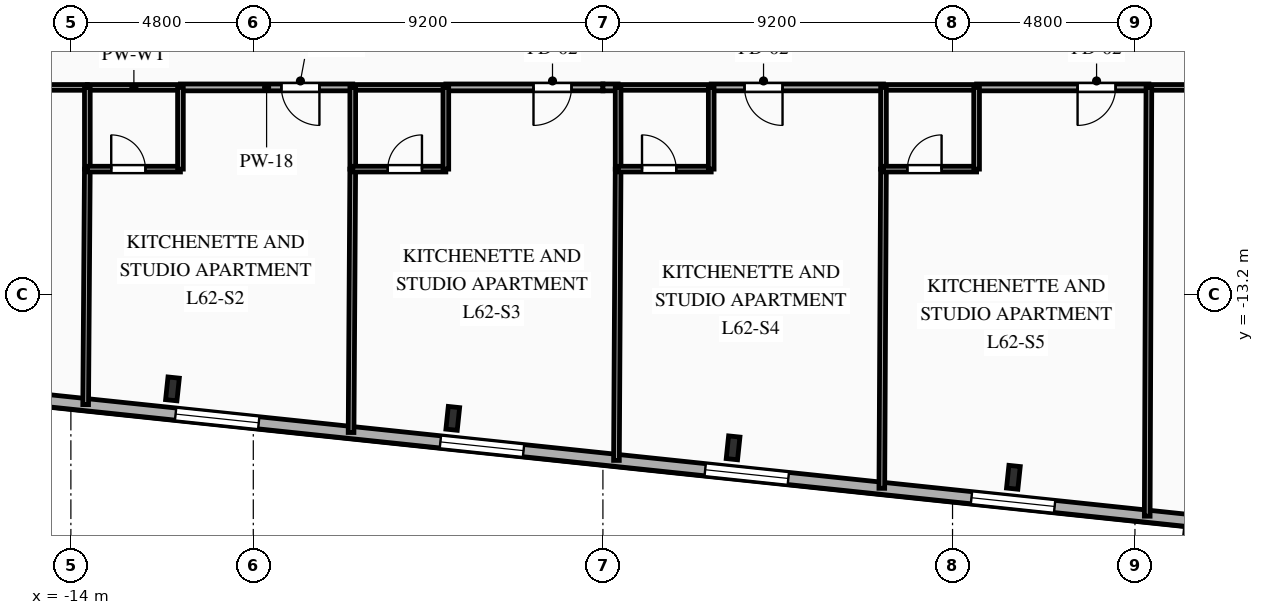
"""IFC4 building model, lengths in metres.
Left out: names, types, materials, properties, quantities, classifications, styles, units other than length and angle.
Written with IfcOpenShell. Run it as: python <this file> out.ifc"""

import sys

from ifc_helpers import new_model, si_unit, direction, frame, frame_2d, origin, origin_2d, place, context, subcontext, project, spatial, rectangle, i_section, extrude, element, fill, save


model = new_model("IFC4")
c1 = context("Model", 3, precision=1e-05, world=origin(), true_north=direction((0.0, 1.0)))
c2 = subcontext(c1, "Body", "Model", "MODEL_VIEW")
j1 = project(units=[si_unit("LENGTHUNIT", "METRE"), si_unit("PLANEANGLEUNIT", "RADIAN")], contexts=[c1])
p1 = place(None, origin())
s1 = spatial("IfcSite", under=j1, at=p1, CompositionType="ELEMENT")
p2 = place(p1, origin())
s2 = spatial("IfcBuilding", under=s1, at=p2, CompositionType="ELEMENT")
p3 = place(p2, frame((0.0, 0.0, 219.85)))
s3 = spatial("IfcBuildingStorey", under=s2, at=p3, CompositionType="ELEMENT", Elevation=219.85)
for number, where, z_axis, x_axis in (
    (1, (-11.327, -15.683, 0.0), (0.0, 0.0, 1.0), (0.995, -0.105, 0.0)),
    (2, (-3.951, -16.458, 0.0), (0.0, 0.0, 1.0), (0.995, -0.105, 0.0)),
    (3, (3.425, -17.233, 0.0), (0.0, 0.0, 1.0), (0.995, -0.105, 0.0)),
    (4, (10.801, -18.009, 0.0), (0.0, 0.0, 1.0), (0.995, -0.105, 0.0)),
):
    element("IfcColumn", number, at=place(p3, frame(where, z_axis=z_axis, x_axis=x_axis)), inside=s3, PredefinedType="COLUMN", context=c2, shape_type="SweptSolid", body=[
        extrude(i_section(OverallWidth=0.3, OverallDepth=0.6, WebThickness=0.015, FlangeThickness=0.03, FilletRadius=0.027, at=origin_2d()), origin(), (0.0, 0.0, 1.0), 3.35),
    ])
p4 = place(p3, frame((18.756, -19.498, 0.0), z_axis=(0.0, 0.0, 1.0), x_axis=(-0.994522060044, 0.104526896475, 0.0)))
e5 = element("IfcWall", 5, at=p4, inside=s3, PredefinedType="SOLIDWALL", context=c2, shape_type="SweptSolid", body=[
    extrude(rectangle(XDim=45.8, YDim=0.32, at=frame_2d((22.9, 0.0))), origin(), (0.0, 0.0, 1.0), 3.0),
])
p5 = place(p4, frame((1.657, 0.0, 0.85)))
e6 = element("IfcOpeningElement", 6, at=p5, cuts=e5, PredefinedType="OPENING", context=c2, shape_type="SweptSolid", body=[
    extrude(rectangle(XDim=1.65, YDim=1.85, at=frame_2d((0.825, 0.925))), frame((0.0, 0.17, 0.0), z_axis=(0.0, -1.0, 0.0), x_axis=(1.0, 0.0, 0.0)), (0.0, 0.0, 1.0), 0.34),
])
p6 = place(p4, frame((6.907, 0.0, 0.85)))
e7 = element("IfcOpeningElement", 7, at=p6, cuts=e5, PredefinedType="OPENING", context=c2, shape_type="SweptSolid", body=[
    extrude(rectangle(XDim=2.2, YDim=1.85, at=frame_2d((1.1, 0.925))), frame((0.0, 0.17, 0.0), z_axis=(0.0, -1.0, 0.0), x_axis=(1.0, 0.0, 0.0)), (0.0, 0.0, 1.0), 0.34),
])
p7 = place(p4, frame((13.953, 0.0, 0.85)))
e8 = element("IfcOpeningElement", 8, at=p7, cuts=e5, PredefinedType="OPENING", context=c2, shape_type="SweptSolid", body=[
    extrude(rectangle(XDim=2.2, YDim=1.85, at=frame_2d((1.1, 0.925))), frame((0.0, 0.17, 0.0), z_axis=(0.0, -1.0, 0.0), x_axis=(1.0, 0.0, 0.0)), (0.0, 0.0, 1.0), 0.34),
])
p8 = place(p4, frame((20.959, 0.0, 0.85)))
e9 = element("IfcOpeningElement", 9, at=p8, cuts=e5, PredefinedType="OPENING", context=c2, shape_type="SweptSolid", body=[
    extrude(rectangle(XDim=2.2, YDim=1.85, at=frame_2d((1.1, 0.925))), frame((0.0, 0.17, 0.0), z_axis=(0.0, -1.0, 0.0), x_axis=(1.0, 0.0, 0.0)), (0.0, 0.0, 1.0), 0.34),
])
p9 = place(p4, frame((27.965, 0.0, 0.85)))
e10 = element("IfcOpeningElement", 10, at=p9, cuts=e5, PredefinedType="OPENING", context=c2, shape_type="SweptSolid", body=[
    extrude(rectangle(XDim=2.2, YDim=1.85, at=frame_2d((1.1, 0.925))), frame((0.0, 0.17, 0.0), z_axis=(0.0, -1.0, 0.0), x_axis=(1.0, 0.0, 0.0)), (0.0, 0.0, 1.0), 0.34),
])
p10 = place(p4, frame((35.487, 0.0, 0.85)))
e11 = element("IfcOpeningElement", 11, at=p10, cuts=e5, PredefinedType="OPENING", context=c2, shape_type="SweptSolid", body=[
    extrude(rectangle(XDim=1.65, YDim=1.85, at=frame_2d((0.825, 0.925))), frame((0.0, 0.17, 0.0), z_axis=(0.0, -1.0, 0.0), x_axis=(1.0, 0.0, 0.0)), (0.0, 0.0, 1.0), 0.34),
])
p11 = place(p4, frame((41.212, 0.0, 0.85)))
e12 = element("IfcOpeningElement", 12, at=p11, cuts=e5, PredefinedType="OPENING", context=c2, shape_type="SweptSolid", body=[
    extrude(rectangle(XDim=1.65, YDim=1.85, at=frame_2d((0.825, 0.925))), frame((0.0, 0.17, 0.0), z_axis=(0.0, -1.0, 0.0), x_axis=(1.0, 0.0, 0.0)), (0.0, 0.0, 1.0), 0.34),
])
p12 = place(p3, frame((-13.567, -7.75, 0.0), z_axis=(0.0, 0.0, 1.0), x_axis=(-1.0, 0.0, 0.0)))
e13 = element("IfcWall", 13, at=p12, inside=s3, PredefinedType="PARTITIONING", context=c2, shape_type="SweptSolid", body=[
    extrude(rectangle(XDim=7.383, YDim=0.15, at=frame_2d((3.691, 0.0))), origin(), (0.0, 0.0, 1.0), 3.0),
])
p13 = place(p12, frame((1.227, 0.0, 0.0)))
e14 = element("IfcOpeningElement", 14, at=p13, cuts=e13, PredefinedType="OPENING", context=c2, shape_type="SweptSolid", body=[
    extrude(rectangle(XDim=1.05, YDim=2.15, at=frame_2d((0.525, 1.075))), frame((0.0, 0.085, 0.0), z_axis=(0.0, -1.0, 0.0), x_axis=(1.0, 0.0, 0.0)), (0.0, 0.0, 1.0), 0.17),
])
p14 = place(p3, frame((-6.583, -7.75, 0.0), z_axis=(0.0, 0.0, 1.0), x_axis=(-1.0, 0.0, 0.0)))
e15 = element("IfcWall", 15, at=p14, inside=s3, PredefinedType="PARTITIONING", context=c2, shape_type="SweptSolid", body=[
    extrude(rectangle(XDim=4.534, YDim=0.18, at=frame_2d((2.267, 0.0))), origin(), (0.0, 0.0, 1.0), 3.0),
])
p15 = place(p14, frame((0.877, 0.0, 0.0)))
e16 = element("IfcOpeningElement", 16, at=p15, cuts=e15, PredefinedType="OPENING", context=c2, shape_type="SweptSolid", body=[
    extrude(rectangle(XDim=1.0, YDim=2.15, at=frame_2d((0.5, 1.075))), frame((0.0, 0.1, 0.0), z_axis=(0.0, -1.0, 0.0), x_axis=(1.0, 0.0, 0.0)), (0.0, 0.0, 1.0), 0.2),
])
p16 = place(p3, frame((-11.117, -7.75, 0.0), z_axis=(0.0, 0.0, 1.0), x_axis=(-1.0, 0.0, 0.0)))
e17 = element("IfcWall", 17, at=p16, inside=s3, PredefinedType="PLUMBINGWALL", context=c2, shape_type="SweptSolid", body=[
    extrude(rectangle(XDim=2.45, YDim=0.15, at=frame_2d((1.225, 0.0))), origin(), (0.0, 0.0, 1.0), 3.0),
])
p17 = place(p3, frame((0.0, -7.75, 0.0), z_axis=(0.0, 0.0, 1.0), x_axis=(-1.0, 0.0, 0.0)))
e18 = element("IfcWall", 18, at=p17, inside=s3, PredefinedType="PARTITIONING", context=c2, shape_type="SweptSolid", body=[
    extrude(rectangle(XDim=4.133, YDim=0.18, at=frame_2d((2.066, 0.0))), origin(), (0.0, 0.0, 1.0), 3.0),
])
p18 = place(p17, frame((0.827, 0.0, 0.0)))
e19 = element("IfcOpeningElement", 19, at=p18, cuts=e18, PredefinedType="OPENING", context=c2, shape_type="SweptSolid", body=[
    extrude(rectangle(XDim=1.0, YDim=2.15, at=frame_2d((0.5, 1.075))), frame((0.0, 0.1, 0.0), z_axis=(0.0, -1.0, 0.0), x_axis=(1.0, 0.0, 0.0)), (0.0, 0.0, 1.0), 0.2),
])
p19 = place(p3, frame((-4.133, -7.75, 0.0), z_axis=(0.0, 0.0, 1.0), x_axis=(-1.0, 0.0, 0.0)))
e20 = element("IfcWall", 20, at=p19, inside=s3, PredefinedType="PLUMBINGWALL", context=c2, shape_type="SweptSolid", body=[
    extrude(rectangle(XDim=2.45, YDim=0.15, at=frame_2d((1.225, 0.0))), origin(), (0.0, 0.0, 1.0), 3.0),
])
p20 = place(p3, frame((0.4, -7.75, 0.0), z_axis=(0.0, 0.0, 1.0), x_axis=(-1.0, 0.0, 0.0)))
e21 = element("IfcWall", 21, at=p20, inside=s3, PredefinedType="PARTITIONING", context=c2, shape_type="SweptSolid", body=[
    extrude(rectangle(XDim=0.4, YDim=0.18, at=frame_2d((0.2, 0.0))), origin(), (0.0, 0.0, 1.0), 3.0),
])
p21 = place(p3, frame((7.383, -7.75, 0.0), z_axis=(0.0, 0.0, 1.0), x_axis=(-1.0, 0.0, 0.0)))
e22 = element("IfcWall", 22, at=p21, inside=s3, PredefinedType="PARTITIONING", context=c2, shape_type="SweptSolid", body=[
    extrude(rectangle(XDim=4.533, YDim=0.18, at=frame_2d((2.267, 0.0))), origin(), (0.0, 0.0, 1.0), 3.0),
])
p22 = place(p21, frame((2.656, 0.0, 0.0)))
e23 = element("IfcOpeningElement", 23, at=p22, cuts=e22, PredefinedType="OPENING", context=c2, shape_type="SweptSolid", body=[
    extrude(rectangle(XDim=1.0, YDim=2.15, at=frame_2d((0.5, 1.075))), frame((0.0, 0.1, 0.0), z_axis=(0.0, -1.0, 0.0), x_axis=(1.0, 0.0, 0.0)), (0.0, 0.0, 1.0), 0.2),
])
p23 = place(p3, frame((2.85, -7.75, 0.0), z_axis=(0.0, 0.0, 1.0), x_axis=(-1.0, 0.0, 0.0)))
e24 = element("IfcWall", 24, at=p23, inside=s3, PredefinedType="PLUMBINGWALL", context=c2, shape_type="SweptSolid", body=[
    extrude(rectangle(XDim=2.45, YDim=0.15, at=frame_2d((1.225, 0.0))), origin(), (0.0, 0.0, 1.0), 3.0),
])
p24 = place(p3, frame((14.367, -7.75, 0.0), z_axis=(0.0, 0.0, 1.0), x_axis=(-1.0, 0.0, 0.0)))
e25 = element("IfcWall", 25, at=p24, inside=s3, PredefinedType="PARTITIONING", context=c2, shape_type="SweptSolid", body=[
    extrude(rectangle(XDim=4.534, YDim=0.18, at=frame_2d((2.267, 0.0))), origin(), (0.0, 0.0, 1.0), 3.0),
])
p25 = place(p24, frame((0.877, 0.0, 0.0)))
e26 = element("IfcOpeningElement", 26, at=p25, cuts=e25, PredefinedType="OPENING", context=c2, shape_type="SweptSolid", body=[
    extrude(rectangle(XDim=1.0, YDim=2.15, at=frame_2d((0.5, 1.075))), frame((0.0, 0.1, 0.0), z_axis=(0.0, -1.0, 0.0), x_axis=(1.0, 0.0, 0.0)), (0.0, 0.0, 1.0), 0.2),
])
p26 = place(p3, frame((9.833, -7.75, 0.0), z_axis=(0.0, 0.0, 1.0), x_axis=(-1.0, 0.0, 0.0)))
e27 = element("IfcWall", 27, at=p26, inside=s3, PredefinedType="PLUMBINGWALL", context=c2, shape_type="SweptSolid", body=[
    extrude(rectangle(XDim=2.45, YDim=0.15, at=frame_2d((1.225, 0.0))), origin(), (0.0, 0.0, 1.0), 3.0),
])
p27 = place(p3, frame((20.95, -7.75, 0.0), z_axis=(0.0, 0.0, 1.0), x_axis=(-1.0, 0.0, 0.0)))
e28 = element("IfcWall", 28, at=p27, inside=s3, PredefinedType="PARTITIONING", context=c2, shape_type="SweptSolid", body=[
    extrude(rectangle(XDim=6.583, YDim=0.15, at=frame_2d((3.292, 0.0))), origin(), (0.0, 0.0, 1.0), 3.0),
])
p28 = place(p27, frame((4.406, 0.0, 0.0)))
e29 = element("IfcOpeningElement", 29, at=p28, cuts=e28, PredefinedType="OPENING", context=c2, shape_type="SweptSolid", body=[
    extrude(rectangle(XDim=1.05, YDim=2.15, at=frame_2d((0.525, 1.075))), frame((0.0, 0.085, 0.0), z_axis=(0.0, -1.0, 0.0), x_axis=(1.0, 0.0, 0.0)), (0.0, 0.0, 1.0), 0.17),
])
p29 = place(p3, frame((-13.567, -9.9, 0.0), z_axis=(0.0, 0.0, 1.0), x_axis=(-0.007091740814, -0.99997485329, 0.0)))
e30 = element("IfcWall", 30, at=p29, inside=s3, PredefinedType="PARTITIONING", context=c2, shape_type="SweptSolid", body=[
    extrude(rectangle(XDim=6.197, YDim=0.15, at=frame_2d((3.098, 0.0))), origin(), (0.0, 0.0, 1.0), 3.0),
])
p30 = place(p3, frame((-13.567, -7.75, 0.0), z_axis=(0.0, 0.0, 1.0), x_axis=(0.0, -1.0, 0.0)))
e31 = element("IfcWall", 31, at=p30, inside=s3, PredefinedType="PLUMBINGWALL", context=c2, shape_type="SweptSolid", body=[
    extrude(rectangle(XDim=2.15, YDim=0.15, at=frame_2d((1.075, 0.0))), origin(), (0.0, 0.0, 1.0), 3.0),
])
p31 = place(p3, frame((-13.567, -9.9, 0.0), z_axis=(0.0, 0.0, 1.0), x_axis=(1.0, 0.0, 0.0)))
e32 = element("IfcWall", 32, at=p31, inside=s3, PredefinedType="PLUMBINGWALL", context=c2, shape_type="SweptSolid", body=[
    extrude(rectangle(XDim=2.45, YDim=0.15, at=frame_2d((1.225, 0.0))), origin(), (0.0, 0.0, 1.0), 3.0),
])
p32 = place(p31, frame((0.629, 0.0, 0.0)))
e33 = element("IfcOpeningElement", 33, at=p32, cuts=e32, PredefinedType="OPENING", context=c2, shape_type="SweptSolid", body=[
    extrude(rectangle(XDim=0.9, YDim=2.1, at=frame_2d((0.45, 1.05))), frame((0.0, 0.085, 0.0), z_axis=(0.0, -1.0, 0.0), x_axis=(1.0, 0.0, 0.0)), (0.0, 0.0, 1.0), 0.17),
])
p33 = place(p3, frame((-11.117, -9.9, 0.0), z_axis=(0.0, 0.0, 1.0), x_axis=(0.0, 1.0, 0.0)))
e34 = element("IfcWall", 34, at=p33, inside=s3, PredefinedType="PLUMBINGWALL", context=c2, shape_type="SweptSolid", body=[
    extrude(rectangle(XDim=2.15, YDim=0.15, at=frame_2d((1.075, 0.0))), origin(), (0.0, 0.0, 1.0), 3.0),
])
p34 = place(p3, frame((-6.583, -9.9, 0.0), z_axis=(0.0, 0.0, 1.0), x_axis=(-0.006340579882, -0.999979898321, 0.0)))
e35 = element("IfcWall", 35, at=p34, inside=s3, PredefinedType="PARTITIONING", context=c2, shape_type="SweptSolid", body=[
    extrude(rectangle(XDim=6.931, YDim=0.15, at=frame_2d((3.465, 0.0))), origin(), (0.0, 0.0, 1.0), 3.0),
])
p35 = place(p3, frame((-6.583, -7.75, 0.0), z_axis=(0.0, 0.0, 1.0), x_axis=(0.0, -1.0, 0.0)))
e36 = element("IfcWall", 36, at=p35, inside=s3, PredefinedType="PLUMBINGWALL", context=c2, shape_type="SweptSolid", body=[
    extrude(rectangle(XDim=2.15, YDim=0.15, at=frame_2d((1.075, 0.0))), origin(), (0.0, 0.0, 1.0), 3.0),
])
p36 = place(p3, frame((-6.583, -9.9, 0.0), z_axis=(0.0, 0.0, 1.0), x_axis=(1.0, 0.0, 0.0)))
e37 = element("IfcWall", 37, at=p36, inside=s3, PredefinedType="PLUMBINGWALL", context=c2, shape_type="SweptSolid", body=[
    extrude(rectangle(XDim=2.45, YDim=0.15, at=frame_2d((1.225, 0.0))), origin(), (0.0, 0.0, 1.0), 3.0),
])
p37 = place(p36, frame((0.921, 0.0, 0.0)))
e38 = element("IfcOpeningElement", 38, at=p37, cuts=e37, PredefinedType="OPENING", context=c2, shape_type="SweptSolid", body=[
    extrude(rectangle(XDim=0.9, YDim=2.1, at=frame_2d((0.45, 1.05))), frame((0.0, 0.085, 0.0), z_axis=(0.0, -1.0, 0.0), x_axis=(1.0, 0.0, 0.0)), (0.0, 0.0, 1.0), 0.17),
])
p38 = place(p3, frame((-4.133, -9.9, 0.0), z_axis=(0.0, 0.0, 1.0), x_axis=(0.0, 1.0, 0.0)))
e39 = element("IfcWall", 39, at=p38, inside=s3, PredefinedType="PLUMBINGWALL", context=c2, shape_type="SweptSolid", body=[
    extrude(rectangle(XDim=2.15, YDim=0.15, at=frame_2d((1.075, 0.0))), origin(), (0.0, 0.0, 1.0), 3.0),
])
p39 = place(p3, frame((0.4, -9.9, 0.0), z_axis=(0.0, 0.0, 1.0), x_axis=(-0.005701633766, -0.999983745554, 0.0)))
e40 = element("IfcWall", 40, at=p39, inside=s3, PredefinedType="PARTITIONING", context=c2, shape_type="SweptSolid", body=[
    extrude(rectangle(XDim=7.665, YDim=0.15, at=frame_2d((3.833, 0.0))), origin(), (0.0, 0.0, 1.0), 3.0),
])
p40 = place(p3, frame((0.4, -7.75, 0.0), z_axis=(0.0, 0.0, 1.0), x_axis=(0.0, -1.0, 0.0)))
e41 = element("IfcWall", 41, at=p40, inside=s3, PredefinedType="PLUMBINGWALL", context=c2, shape_type="SweptSolid", body=[
    extrude(rectangle(XDim=2.15, YDim=0.15, at=frame_2d((1.075, 0.0))), origin(), (0.0, 0.0, 1.0), 3.0),
])
p41 = place(p3, frame((0.4, -9.9, 0.0), z_axis=(0.0, 0.0, 1.0), x_axis=(1.0, 0.0, 0.0)))
e42 = element("IfcWall", 42, at=p41, inside=s3, PredefinedType="PLUMBINGWALL", context=c2, shape_type="SweptSolid", body=[
    extrude(rectangle(XDim=2.45, YDim=0.15, at=frame_2d((1.225, 0.0))), origin(), (0.0, 0.0, 1.0), 3.0),
])
p42 = place(p41, frame((0.629, 0.0, 0.0)))
e43 = element("IfcOpeningElement", 43, at=p42, cuts=e42, PredefinedType="OPENING", context=c2, shape_type="SweptSolid", body=[
    extrude(rectangle(XDim=0.9, YDim=2.1, at=frame_2d((0.45, 1.05))), frame((0.0, 0.085, 0.0), z_axis=(0.0, -1.0, 0.0), x_axis=(1.0, 0.0, 0.0)), (0.0, 0.0, 1.0), 0.17),
])
p43 = place(p3, frame((2.85, -9.9, 0.0), z_axis=(0.0, 0.0, 1.0), x_axis=(0.0, 1.0, 0.0)))
e44 = element("IfcWall", 44, at=p43, inside=s3, PredefinedType="PLUMBINGWALL", context=c2, shape_type="SweptSolid", body=[
    extrude(rectangle(XDim=2.15, YDim=0.15, at=frame_2d((1.075, 0.0))), origin(), (0.0, 0.0, 1.0), 3.0),
])
p44 = place(p3, frame((7.383, -9.9, 0.0), z_axis=(0.0, 0.0, 1.0), x_axis=(-0.00523233441, -0.999986311245, 0.0)))
e45 = element("IfcWall", 45, at=p44, inside=s3, PredefinedType="PARTITIONING", context=c2, shape_type="SweptSolid", body=[
    extrude(rectangle(XDim=8.399, YDim=0.15, at=frame_2d((4.199, 0.0))), origin(), (0.0, 0.0, 1.0), 3.0),
])
p45 = place(p3, frame((7.383, -7.75, 0.0), z_axis=(0.0, 0.0, 1.0), x_axis=(0.0, -1.0, 0.0)))
e46 = element("IfcWall", 46, at=p45, inside=s3, PredefinedType="PLUMBINGWALL", context=c2, shape_type="SweptSolid", body=[
    extrude(rectangle(XDim=2.15, YDim=0.15, at=frame_2d((1.075, 0.0))), origin(), (0.0, 0.0, 1.0), 3.0),
])
p46 = place(p3, frame((7.383, -9.9, 0.0), z_axis=(0.0, 0.0, 1.0), x_axis=(1.0, 0.0, 0.0)))
e47 = element("IfcWall", 47, at=p46, inside=s3, PredefinedType="PLUMBINGWALL", context=c2, shape_type="SweptSolid", body=[
    extrude(rectangle(XDim=2.45, YDim=0.15, at=frame_2d((1.225, 0.0))), origin(), (0.0, 0.0, 1.0), 3.0),
])
p47 = place(p46, frame((0.629, 0.0, 0.0)))
e48 = element("IfcOpeningElement", 48, at=p47, cuts=e47, PredefinedType="OPENING", context=c2, shape_type="SweptSolid", body=[
    extrude(rectangle(XDim=0.9, YDim=2.1, at=frame_2d((0.45, 1.05))), frame((0.0, 0.085, 0.0), z_axis=(0.0, -1.0, 0.0), x_axis=(1.0, 0.0, 0.0)), (0.0, 0.0, 1.0), 0.17),
])
p48 = place(p3, frame((9.833, -9.9, 0.0), z_axis=(0.0, 0.0, 1.0), x_axis=(0.0, 1.0, 0.0)))
e49 = element("IfcWall", 49, at=p48, inside=s3, PredefinedType="PLUMBINGWALL", context=c2, shape_type="SweptSolid", body=[
    extrude(rectangle(XDim=2.15, YDim=0.15, at=frame_2d((1.075, 0.0))), origin(), (0.0, 0.0, 1.0), 3.0),
])
p49 = place(p3, frame((14.367, -7.75, 0.0), z_axis=(0.0, 0.0, 1.0), x_axis=(-0.003894978353, -0.999992414543, 0.0)))
e50 = element("IfcWall", 50, at=p49, inside=s3, PredefinedType="PARTITIONING", context=c2, shape_type="SweptSolid", body=[
    extrude(rectangle(XDim=11.282, YDim=0.15, at=frame_2d((5.641, 0.0))), origin(), (0.0, 0.0, 1.0), 3.0),
])
p50 = place(p6, origin())
e51 = element("IfcWindow", 51, at=p50, inside=s3, PartitioningType="SINGLE_PANEL", PredefinedType="WINDOW", context=c2, shape_type="SweptSolid", body=[
    extrude(rectangle(XDim=2.2, YDim=1.85, at=frame_2d((1.1, 0.925))), frame((0.0, 0.03, 0.0), z_axis=(0.0, -1.0, 0.0), x_axis=(1.0, 0.0, 0.0)), (0.0, 0.0, 1.0), 0.06),
])
fill(e7, e51)
p51 = place(p7, origin())
e52 = element("IfcWindow", 52, at=p51, inside=s3, PartitioningType="SINGLE_PANEL", PredefinedType="WINDOW", context=c2, shape_type="SweptSolid", body=[
    extrude(rectangle(XDim=2.2, YDim=1.85, at=frame_2d((1.1, 0.925))), frame((0.0, 0.03, 0.0), z_axis=(0.0, -1.0, 0.0), x_axis=(1.0, 0.0, 0.0)), (0.0, 0.0, 1.0), 0.06),
])
fill(e8, e52)
p52 = place(p8, origin())
e53 = element("IfcWindow", 53, at=p52, inside=s3, PartitioningType="SINGLE_PANEL", PredefinedType="WINDOW", context=c2, shape_type="SweptSolid", body=[
    extrude(rectangle(XDim=2.2, YDim=1.85, at=frame_2d((1.1, 0.925))), frame((0.0, 0.03, 0.0), z_axis=(0.0, -1.0, 0.0), x_axis=(1.0, 0.0, 0.0)), (0.0, 0.0, 1.0), 0.06),
])
fill(e9, e53)
p53 = place(p9, origin())
e54 = element("IfcWindow", 54, at=p53, inside=s3, PartitioningType="SINGLE_PANEL", PredefinedType="WINDOW", context=c2, shape_type="SweptSolid", body=[
    extrude(rectangle(XDim=2.2, YDim=1.85, at=frame_2d((1.1, 0.925))), frame((0.0, 0.03, 0.0), z_axis=(0.0, -1.0, 0.0), x_axis=(1.0, 0.0, 0.0)), (0.0, 0.0, 1.0), 0.06),
])
fill(e10, e54)
p54 = place(p15, origin())
e55 = element("IfcDoor", 55, at=p54, inside=s3, OperationType="SINGLE_SWING_LEFT", PredefinedType="DOOR", context=c2, shape_type="SweptSolid", body=[
    extrude(rectangle(XDim=1.0, YDim=2.15, at=frame_2d((0.5, 1.075))), frame((0.0, 0.025, 0.0), z_axis=(0.0, -1.0, 0.0), x_axis=(1.0, 0.0, 0.0)), (0.0, 0.0, 1.0), 0.05),
])
fill(e16, e55)
p55 = place(p18, origin())
e56 = element("IfcDoor", 56, at=p55, inside=s3, OperationType="SINGLE_SWING_RIGHT", PredefinedType="DOOR", context=c2, shape_type="SweptSolid", body=[
    extrude(rectangle(XDim=1.0, YDim=2.15, at=frame_2d((0.5, 1.075))), frame((0.0, 0.025, 0.0), z_axis=(0.0, -1.0, 0.0), x_axis=(1.0, 0.0, 0.0)), (0.0, 0.0, 1.0), 0.05),
])
fill(e19, e56)
p56 = place(p22, origin())
e57 = element("IfcDoor", 57, at=p56, inside=s3, OperationType="SINGLE_SWING_LEFT", PredefinedType="DOOR", context=c2, shape_type="SweptSolid", body=[
    extrude(rectangle(XDim=1.0, YDim=2.15, at=frame_2d((0.5, 1.075))), frame((0.0, 0.025, 0.0), z_axis=(0.0, -1.0, 0.0), x_axis=(1.0, 0.0, 0.0)), (0.0, 0.0, 1.0), 0.05),
])
fill(e23, e57)
p57 = place(p25, origin())
e58 = element("IfcDoor", 58, at=p57, inside=s3, OperationType="SINGLE_SWING_RIGHT", PredefinedType="DOOR", context=c2, shape_type="SweptSolid", body=[
    extrude(rectangle(XDim=1.0, YDim=2.15, at=frame_2d((0.5, 1.075))), frame((0.0, 0.025, 0.0), z_axis=(0.0, -1.0, 0.0), x_axis=(1.0, 0.0, 0.0)), (0.0, 0.0, 1.0), 0.05),
])
fill(e26, e58)
p58 = place(p32, origin())
e59 = element("IfcDoor", 59, at=p58, inside=s3, OperationType="SINGLE_SWING_LEFT", PredefinedType="DOOR", context=c2, shape_type="SweptSolid", body=[
    extrude(rectangle(XDim=0.9, YDim=2.1, at=frame_2d((0.45, 1.05))), frame((0.0, 0.025, 0.0), z_axis=(0.0, -1.0, 0.0), x_axis=(1.0, 0.0, 0.0)), (0.0, 0.0, 1.0), 0.05),
])
fill(e33, e59)
p59 = place(p37, origin())
e60 = element("IfcDoor", 60, at=p59, inside=s3, OperationType="SINGLE_SWING_RIGHT", PredefinedType="DOOR", context=c2, shape_type="SweptSolid", body=[
    extrude(rectangle(XDim=0.9, YDim=2.1, at=frame_2d((0.45, 1.05))), frame((0.0, 0.025, 0.0), z_axis=(0.0, -1.0, 0.0), x_axis=(1.0, 0.0, 0.0)), (0.0, 0.0, 1.0), 0.05),
])
fill(e38, e60)
p60 = place(p42, origin())
e61 = element("IfcDoor", 61, at=p60, inside=s3, OperationType="SINGLE_SWING_LEFT", PredefinedType="DOOR", context=c2, shape_type="SweptSolid", body=[
    extrude(rectangle(XDim=0.9, YDim=2.1, at=frame_2d((0.45, 1.05))), frame((0.0, 0.025, 0.0), z_axis=(0.0, -1.0, 0.0), x_axis=(1.0, 0.0, 0.0)), (0.0, 0.0, 1.0), 0.05),
])
fill(e43, e61)
p61 = place(p47, origin())
e62 = element("IfcDoor", 62, at=p61, inside=s3, OperationType="SINGLE_SWING_RIGHT", PredefinedType="DOOR", context=c2, shape_type="SweptSolid", body=[
    extrude(rectangle(XDim=0.9, YDim=2.1, at=frame_2d((0.45, 1.05))), frame((0.0, 0.025, 0.0), z_axis=(0.0, -1.0, 0.0), x_axis=(1.0, 0.0, 0.0)), (0.0, 0.0, 1.0), 0.05),
])
fill(e48, e62)
save(model, sys.argv[1])
